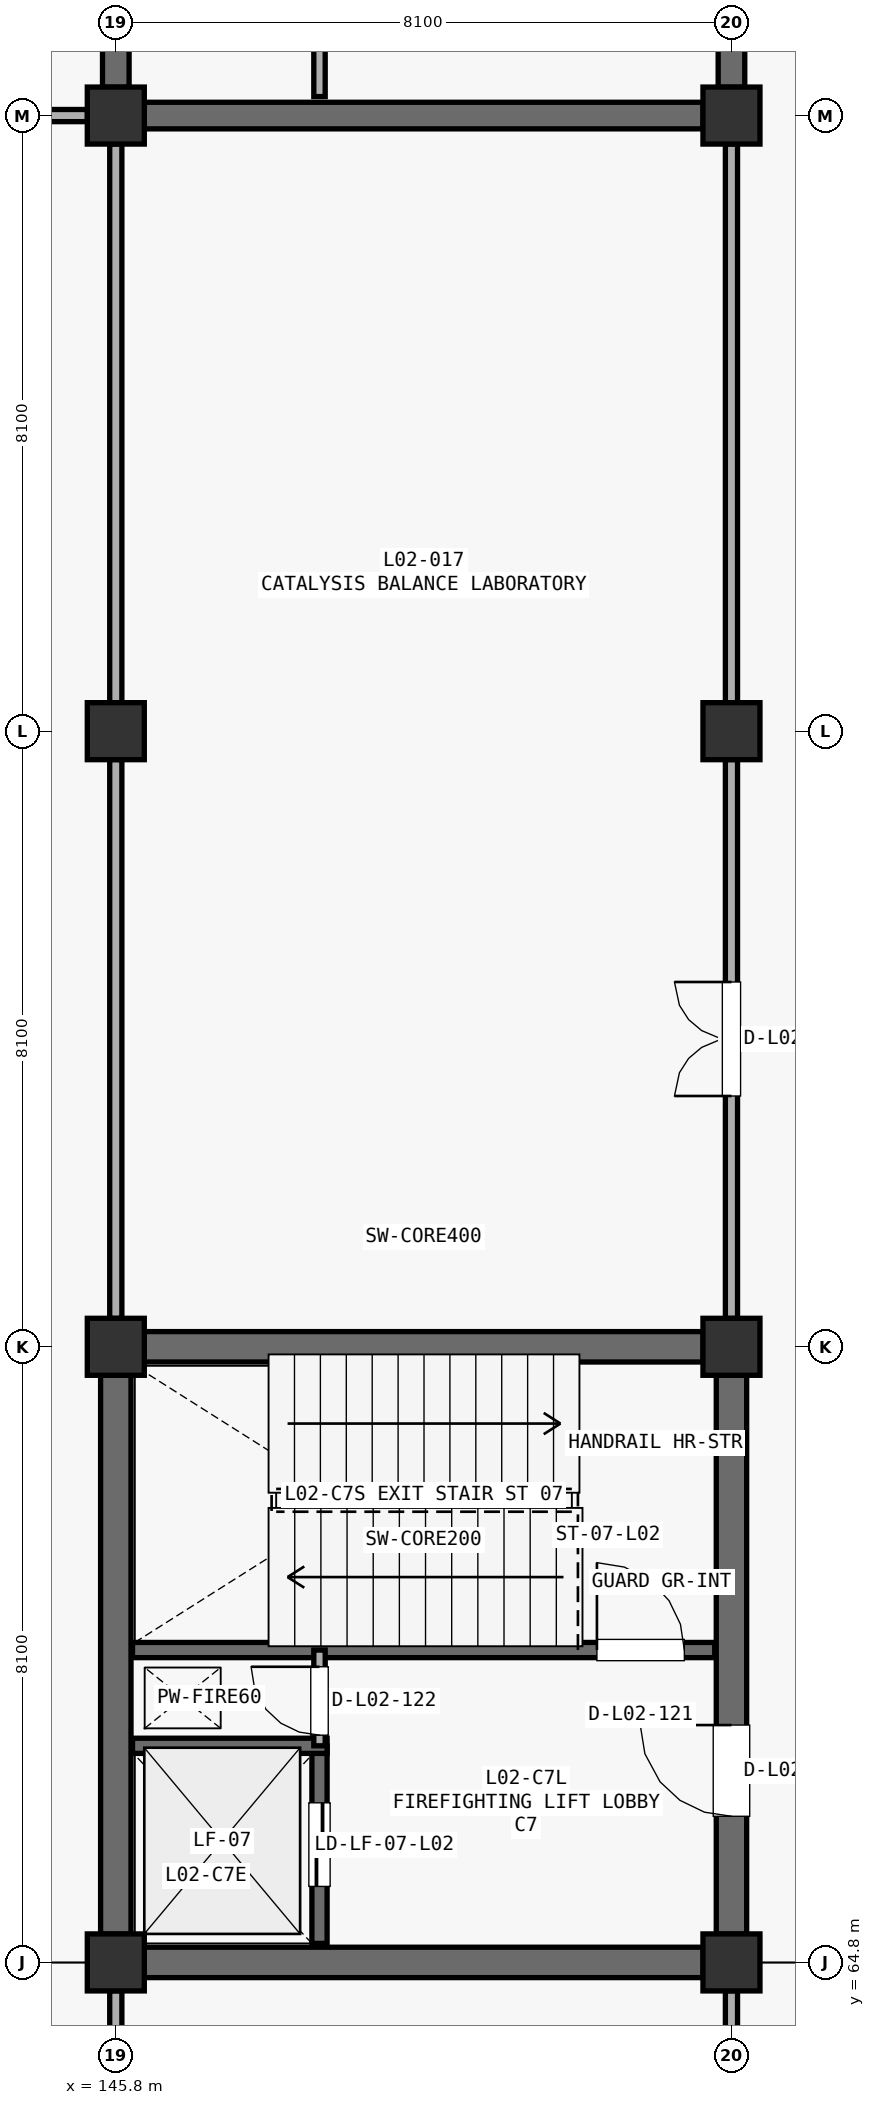
"""IFC4 building model, lengths in metres.
Left out: names, types, materials, properties, quantities, classifications, styles, units other than length and angle.
Written with IfcOpenShell. Run it as: python <this file> out.ifc"""

import sys

from ifc_helpers import new_model, si_unit, direction, frame, frame_2d, origin, origin_2d, place, context, subcontext, project, spatial, rectangle, extrude, element, fill, save


model = new_model("IFC4")
c1 = context("Model", 3, precision=1e-05, world=origin(), true_north=direction((0.0, 1.0)))
c2 = subcontext(c1, "Body", "Model", "MODEL_VIEW")
j1 = project(units=[si_unit("LENGTHUNIT", "METRE"), si_unit("PLANEANGLEUNIT", "RADIAN")], contexts=[c1])
p1 = place(None, origin())
s1 = spatial("IfcSite", under=j1, at=p1, CompositionType="ELEMENT")
p2 = place(p1, origin())
s2 = spatial("IfcBuilding", under=s1, at=p2, CompositionType="ELEMENT")
p3 = place(p2, frame((0.0, 0.0, 9.69)))
s3 = spatial("IfcBuildingStorey", under=s2, at=p3, CompositionType="ELEMENT", Elevation=9.69)
for number, where, z_axis, x_axis in (
    (1, (145.8, 64.8, 0.0), (0.0, 0.0, 1.0), (1.0, 0.0, 0.0)),
    (2, (145.8, 72.9, 0.0), (0.0, 0.0, 1.0), (1.0, 0.0, 0.0)),
    (3, (145.8, 81.0, 0.0), (0.0, 0.0, 1.0), (1.0, 0.0, 0.0)),
    (4, (145.8, 89.1, 0.0), (0.0, 0.0, 1.0), (1.0, 0.0, 0.0)),
    (5, (153.9, 64.8, 0.0), (0.0, 0.0, 1.0), (1.0, 0.0, 0.0)),
    (6, (153.9, 72.9, 0.0), (0.0, 0.0, 1.0), (1.0, 0.0, 0.0)),
    (7, (153.9, 81.0, 0.0), (0.0, 0.0, 1.0), (1.0, 0.0, 0.0)),
    (8, (153.9, 89.1, 0.0), (0.0, 0.0, 1.0), (1.0, 0.0, 0.0)),
):
    element("IfcColumn", number, at=place(p3, frame(where, z_axis=z_axis, x_axis=x_axis)), inside=s3, PredefinedType="COLUMN", context=c2, shape_type="SweptSolid", body=[
        extrude(rectangle(XDim=0.75, YDim=0.75, at=origin_2d()), origin(), (0.0, 0.0, 1.0), 4.42),
    ])
for number, where, z_axis, x_axis in (
    (9, (146.173, 72.9, 0.0), (0.0, 0.0, 1.0), (1.0, 0.0, 0.0)),
    (10, (145.8, 65.173, 0.0), (0.0, 0.0, 1.0), (0.0, 1.0, 0.0)),
):
    element("IfcWall", number, at=place(p3, frame(where, z_axis=z_axis, x_axis=x_axis)), inside=s3, PredefinedType="SHEAR", context=c2, shape_type="SweptSolid", body=[
        extrude(rectangle(XDim=7.354, YDim=0.4, at=frame_2d((3.677, 0.0))), origin(), (0.0, 0.0, 1.0), 4.142),
    ])
p4 = place(p3, frame((153.9, 65.173, 0.0), z_axis=(0.0, 0.0, 1.0), x_axis=(0.0, 1.0, 0.0)))
e11 = element("IfcWall", 11, at=p4, inside=s3, PredefinedType="SHEAR", context=c2, shape_type="SweptSolid", body=[
    extrude(rectangle(XDim=7.354, YDim=0.4, at=frame_2d((3.677, 0.0))), origin(), (0.0, 0.0, 1.0), 4.142),
])
p5 = place(p4, frame((1.55, 0.0, 0.0)))
e12 = element("IfcOpeningElement", 12, at=p5, cuts=e11, PredefinedType="OPENING", context=c2, shape_type="SweptSolid", body=[
    extrude(rectangle(XDim=1.2, YDim=2.2, at=frame_2d((0.6, 1.1))), frame((0.0, 0.21, 0.0), z_axis=(0.0, -1.0, 0.0), x_axis=(1.0, 0.0, 0.0)), (0.0, 0.0, 1.0), 0.42),
])
p6 = place(p3, frame((146.173, 64.8, 0.0), z_axis=(0.0, 0.0, 1.0), x_axis=(1.0, 0.0, 0.0)))
e13 = element("IfcWall", 13, at=p6, inside=s3, PredefinedType="SHEAR", context=c2, shape_type="SweptSolid", body=[
    extrude(rectangle(XDim=7.354, YDim=0.4, at=frame_2d((3.677, 0.0))), origin(), (0.0, 0.0, 1.0), 4.142),
])
p7 = place(p3, frame((146.02, 68.91, 0.0), z_axis=(0.0, 0.0, 1.0), x_axis=(1.0, 0.0, 0.0)))
e14 = element("IfcWall", 14, at=p7, inside=s3, PredefinedType="SHEAR", context=c2, shape_type="SweptSolid", body=[
    extrude(rectangle(XDim=7.66, YDim=0.2, at=frame_2d((3.83, 0.0))), origin(), (0.0, 0.0, 1.0), 4.142),
])
p8 = place(p7, frame((6.11, 0.0, 0.0)))
e15 = element("IfcOpeningElement", 15, at=p8, cuts=e14, PredefinedType="OPENING", context=c2, shape_type="SweptSolid", body=[
    extrude(rectangle(XDim=1.15, YDim=2.2, at=frame_2d((0.575, 1.1))), frame((0.0, 0.11, 0.0), z_axis=(0.0, -1.0, 0.0), x_axis=(1.0, 0.0, 0.0)), (0.0, 0.0, 1.0), 0.22),
])
p9 = place(p3, frame((148.48, 65.05, 0.0), z_axis=(0.0, 0.0, 1.0), x_axis=(0.0, 1.0, 0.0)))
e16 = element("IfcWall", 16, at=p9, inside=s3, PredefinedType="SHEAR", context=c2, shape_type="SweptSolid", body=[
    extrude(rectangle(XDim=2.6, YDim=0.2, at=frame_2d((1.3, 0.0))), origin(), (0.0, 0.0, 1.0), 4.142),
])
p10 = place(p9, frame((0.75, 0.0, 0.0)))
e17 = element("IfcOpeningElement", 17, at=p10, cuts=e16, PredefinedType="OPENING", context=c2, shape_type="SweptSolid", body=[
    extrude(rectangle(XDim=1.1, YDim=2.2, at=frame_2d((0.55, 1.1))), frame((0.0, 0.11, 0.0), z_axis=(0.0, -1.0, 0.0), x_axis=(1.0, 0.0, 0.0)), (0.0, 0.0, 1.0), 0.22),
])
p11 = place(p3, frame((146.02, 67.65, 0.0), z_axis=(0.0, 0.0, 1.0), x_axis=(1.0, 0.0, 0.0)))
e18 = element("IfcWall", 18, at=p11, inside=s3, PredefinedType="SHEAR", context=c2, shape_type="SweptSolid", body=[
    extrude(rectangle(XDim=2.56, YDim=0.2, at=frame_2d((1.28, 0.0))), origin(), (0.0, 0.0, 1.0), 4.142),
])
p12 = place(p3, frame((148.48, 67.65, 0.0), z_axis=(0.0, 0.0, 1.0), x_axis=(0.0, 1.0, 0.0)))
e19 = element("IfcWall", 19, at=p12, inside=s3, PredefinedType="PARTITIONING", context=c2, shape_type="SweptSolid", body=[
    extrude(rectangle(XDim=1.26, YDim=0.15, at=frame_2d((0.63, 0.0))), origin(), (0.0, 0.0, 1.0), 4.142),
])
p13 = place(p12, frame((0.14, 0.0, 0.0)))
e20 = element("IfcOpeningElement", 20, at=p13, cuts=e19, PredefinedType="OPENING", context=c2, shape_type="SweptSolid", body=[
    extrude(rectangle(XDim=0.9, YDim=2.15, at=frame_2d((0.45, 1.075))), frame((0.0, 0.085, 0.0), z_axis=(0.0, -1.0, 0.0), x_axis=(1.0, 0.0, 0.0)), (0.0, 0.0, 1.0), 0.17),
])
p14 = place(p3, frame((145.8, 89.473, 0.0), z_axis=(0.0, 0.0, 1.0), x_axis=(0.0, 1.0, 0.0)))
e21 = element("IfcWall", 21, at=p14, inside=s3, PredefinedType="SHEAR", context=c2, shape_type="SweptSolid", body=[
    extrude(rectangle(XDim=7.354, YDim=0.35, at=frame_2d((3.677, 0.0))), origin(), (0.0, 0.0, 1.0), 4.142),
])
p15 = place(p3, frame((153.9, 89.473, 0.0), z_axis=(0.0, 0.0, 1.0), x_axis=(0.0, 1.0, 0.0)))
e22 = element("IfcWall", 22, at=p15, inside=s3, PredefinedType="SHEAR", context=c2, shape_type="SweptSolid", body=[
    extrude(rectangle(XDim=7.354, YDim=0.35, at=frame_2d((3.677, 0.0))), origin(), (0.0, 0.0, 1.0), 4.142),
])
p16 = place(p15, frame((1.55, 0.0, 0.0)))
e23 = element("IfcOpeningElement", 23, at=p16, cuts=e22, PredefinedType="OPENING", context=c2, shape_type="SweptSolid", body=[
    extrude(rectangle(XDim=1.2, YDim=2.2, at=frame_2d((0.6, 1.1))), frame((0.0, 0.185, 0.0), z_axis=(0.0, -1.0, 0.0), x_axis=(1.0, 0.0, 0.0)), (0.0, 0.0, 1.0), 0.37),
])
p17 = place(p3, frame((146.173, 89.1, 0.0), z_axis=(0.0, 0.0, 1.0), x_axis=(1.0, 0.0, 0.0)))
e24 = element("IfcWall", 24, at=p17, inside=s3, PredefinedType="SHEAR", context=c2, shape_type="SweptSolid", body=[
    extrude(rectangle(XDim=7.354, YDim=0.35, at=frame_2d((3.677, 0.0))), origin(), (0.0, 0.0, 1.0), 4.142),
])
p18 = place(p3, frame((148.48, 89.35, 0.0), z_axis=(0.0, 0.0, 1.0), x_axis=(0.0, 1.0, 0.0)))
e25 = element("IfcWall", 25, at=p18, inside=s3, PredefinedType="PARTITIONING", context=c2, shape_type="SweptSolid", body=[
    extrude(rectangle(XDim=2.6, YDim=0.15, at=frame_2d((1.3, 0.0))), origin(), (0.0, 0.0, 1.0), 4.142),
])
p19 = place(p18, frame((0.8, 0.0, 0.0)))
e26 = element("IfcOpeningElement", 26, at=p19, cuts=e25, PredefinedType="OPENING", context=c2, shape_type="SweptSolid", body=[
    extrude(rectangle(XDim=0.95, YDim=2.15, at=frame_2d((0.475, 1.075))), frame((0.0, 0.085, 0.0), z_axis=(0.0, -1.0, 0.0), x_axis=(1.0, 0.0, 0.0)), (0.0, 0.0, 1.0), 0.17),
])
p20 = place(p3, frame((145.8, 57.073, 0.0), z_axis=(0.0, 0.0, 1.0), x_axis=(0.0, 1.0, 0.0)))
e27 = element("IfcWall", 27, at=p20, inside=s3, PredefinedType="PARTITIONING", context=c2, shape_type="SweptSolid", body=[
    extrude(rectangle(XDim=7.354, YDim=0.16, at=frame_2d((3.677, 0.0))), origin(), (0.0, 0.0, 1.0), 3.492),
])
p21 = place(p20, frame((3.077, 0.0, 0.0)))
e28 = element("IfcOpeningElement", 28, at=p21, cuts=e27, PredefinedType="OPENING", context=c2, shape_type="SweptSolid", body=[
    extrude(rectangle(XDim=1.2, YDim=2.2, at=frame_2d((0.6, 1.1))), frame((0.0, 0.09, 0.0), z_axis=(0.0, -1.0, 0.0), x_axis=(1.0, 0.0, 0.0)), (0.0, 0.0, 1.0), 0.18),
])
p22 = place(p3, frame((145.8, 73.273, 0.0), z_axis=(0.0, 0.0, 1.0), x_axis=(0.0, 1.0, 0.0)))
e29 = element("IfcWall", 29, at=p22, inside=s3, PredefinedType="PARTITIONING", context=c2, shape_type="SweptSolid", body=[
    extrude(rectangle(XDim=7.354, YDim=0.16, at=frame_2d((3.677, 0.0))), origin(), (0.0, 0.0, 1.0), 3.292),
])
p23 = place(p3, frame((145.8, 81.373, 0.0), z_axis=(0.0, 0.0, 1.0), x_axis=(0.0, 1.0, 0.0)))
e30 = element("IfcWall", 30, at=p23, inside=s3, PredefinedType="PARTITIONING", context=c2, shape_type="SweptSolid", body=[
    extrude(rectangle(XDim=7.354, YDim=0.16, at=frame_2d((3.677, 0.0))), origin(), (0.0, 0.0, 1.0), 3.192),
])
p24 = place(p3, frame((138.073, 89.1, 0.0), z_axis=(0.0, 0.0, 1.0), x_axis=(1.0, 0.0, 0.0)))
e31 = element("IfcWall", 31, at=p24, inside=s3, PredefinedType="PARTITIONING", context=c2, shape_type="SweptSolid", body=[
    extrude(rectangle(XDim=7.354, YDim=0.16, at=frame_2d((3.677, 0.0))), origin(), (0.0, 0.0, 1.0), 3.492),
])
p25 = place(p3, frame((153.9, 73.273, 0.0), z_axis=(0.0, 0.0, 1.0), x_axis=(0.0, 1.0, 0.0)))
e32 = element("IfcWall", 32, at=p25, inside=s3, PredefinedType="PARTITIONING", context=c2, shape_type="SweptSolid", body=[
    extrude(rectangle(XDim=7.354, YDim=0.16, at=frame_2d((3.677, 0.0))), origin(), (0.0, 0.0, 1.0), 3.392),
])
p26 = place(p25, frame((2.927, 0.0, 0.0)))
e33 = element("IfcOpeningElement", 33, at=p26, cuts=e32, PredefinedType="OPENING", context=c2, shape_type="SweptSolid", body=[
    extrude(rectangle(XDim=1.5, YDim=2.2, at=frame_2d((0.75, 1.1))), frame((0.0, 0.09, 0.0), z_axis=(0.0, -1.0, 0.0), x_axis=(1.0, 0.0, 0.0)), (0.0, 0.0, 1.0), 0.18),
])
p27 = place(p3, frame((153.9, 81.373, 0.0), z_axis=(0.0, 0.0, 1.0), x_axis=(0.0, 1.0, 0.0)))
e34 = element("IfcWall", 34, at=p27, inside=s3, PredefinedType="PARTITIONING", context=c2, shape_type="SweptSolid", body=[
    extrude(rectangle(XDim=7.354, YDim=0.16, at=frame_2d((3.677, 0.0))), origin(), (0.0, 0.0, 1.0), 3.492),
])
p28 = place(p3, frame((153.9, 57.073, 0.0), z_axis=(0.0, 0.0, 1.0), x_axis=(0.0, 1.0, 0.0)))
e35 = element("IfcWall", 35, at=p28, inside=s3, PredefinedType="PARTITIONING", context=c2, shape_type="SweptSolid", body=[
    extrude(rectangle(XDim=7.354, YDim=0.16, at=frame_2d((3.677, 0.0))), origin(), (0.0, 0.0, 1.0), 3.292),
])
p29 = place(p28, frame((2.967, 0.0, 0.0)))
e36 = element("IfcOpeningElement", 36, at=p29, cuts=e35, PredefinedType="OPENING", context=c2, shape_type="SweptSolid", body=[
    extrude(rectangle(XDim=1.42, YDim=2.25, at=frame_2d((0.71, 1.125))), frame((0.0, 0.09, 0.0), z_axis=(0.0, -1.0, 0.0), x_axis=(1.0, 0.0, 0.0)), (0.0, 0.0, 1.0), 0.18),
])
p30 = place(p5, origin())
e37 = element("IfcDoor", 37, at=p30, inside=s3, OperationType="SINGLE_SWING_RIGHT", PredefinedType="DOOR", context=c2, shape_type="SweptSolid", body=[
    extrude(rectangle(XDim=1.2, YDim=2.2, at=frame_2d((0.6, 1.1))), frame((0.0, 0.025, 0.0), z_axis=(0.0, -1.0, 0.0), x_axis=(1.0, 0.0, 0.0)), (0.0, 0.0, 1.0), 0.05),
])
fill(e12, e37)
p31 = place(p8, origin())
e38 = element("IfcDoor", 38, at=p31, inside=s3, OperationType="SINGLE_SWING_LEFT", PredefinedType="DOOR", context=c2, shape_type="SweptSolid", body=[
    extrude(rectangle(XDim=1.15, YDim=2.2, at=frame_2d((0.575, 1.1))), frame((0.0, 0.025, 0.0), z_axis=(0.0, -1.0, 0.0), x_axis=(1.0, 0.0, 0.0)), (0.0, 0.0, 1.0), 0.05),
])
fill(e15, e38)
p32 = place(p10, origin())
e39 = element("IfcDoor", 39, at=p32, inside=s3, OperationType="SLIDING_TO_LEFT", PredefinedType="DOOR", context=c2, shape_type="SweptSolid", body=[
    extrude(rectangle(XDim=1.1, YDim=2.2, at=frame_2d((0.55, 1.1))), frame((0.0, 0.025, 0.0), z_axis=(0.0, -1.0, 0.0), x_axis=(1.0, 0.0, 0.0)), (0.0, 0.0, 1.0), 0.05),
])
fill(e17, e39)
p33 = place(p13, origin())
e40 = element("IfcDoor", 40, at=p33, inside=s3, OperationType="SINGLE_SWING_RIGHT", PredefinedType="DOOR", context=c2, shape_type="SweptSolid", body=[
    extrude(rectangle(XDim=0.9, YDim=2.15, at=frame_2d((0.45, 1.075))), frame((0.0, 0.025, 0.0), z_axis=(0.0, -1.0, 0.0), x_axis=(1.0, 0.0, 0.0)), (0.0, 0.0, 1.0), 0.05),
])
fill(e20, e40)
p34 = place(p26, origin())
e41 = element("IfcDoor", 41, at=p34, inside=s3, OperationType="DOUBLE_SWING_LEFT", PredefinedType="DOOR", context=c2, shape_type="SweptSolid", body=[
    extrude(rectangle(XDim=1.5, YDim=2.2, at=frame_2d((0.75, 1.1))), frame((0.0, 0.025, 0.0), z_axis=(0.0, -1.0, 0.0), x_axis=(1.0, 0.0, 0.0)), (0.0, 0.0, 1.0), 0.05),
])
fill(e33, e41)
save(model, sys.argv[1])
